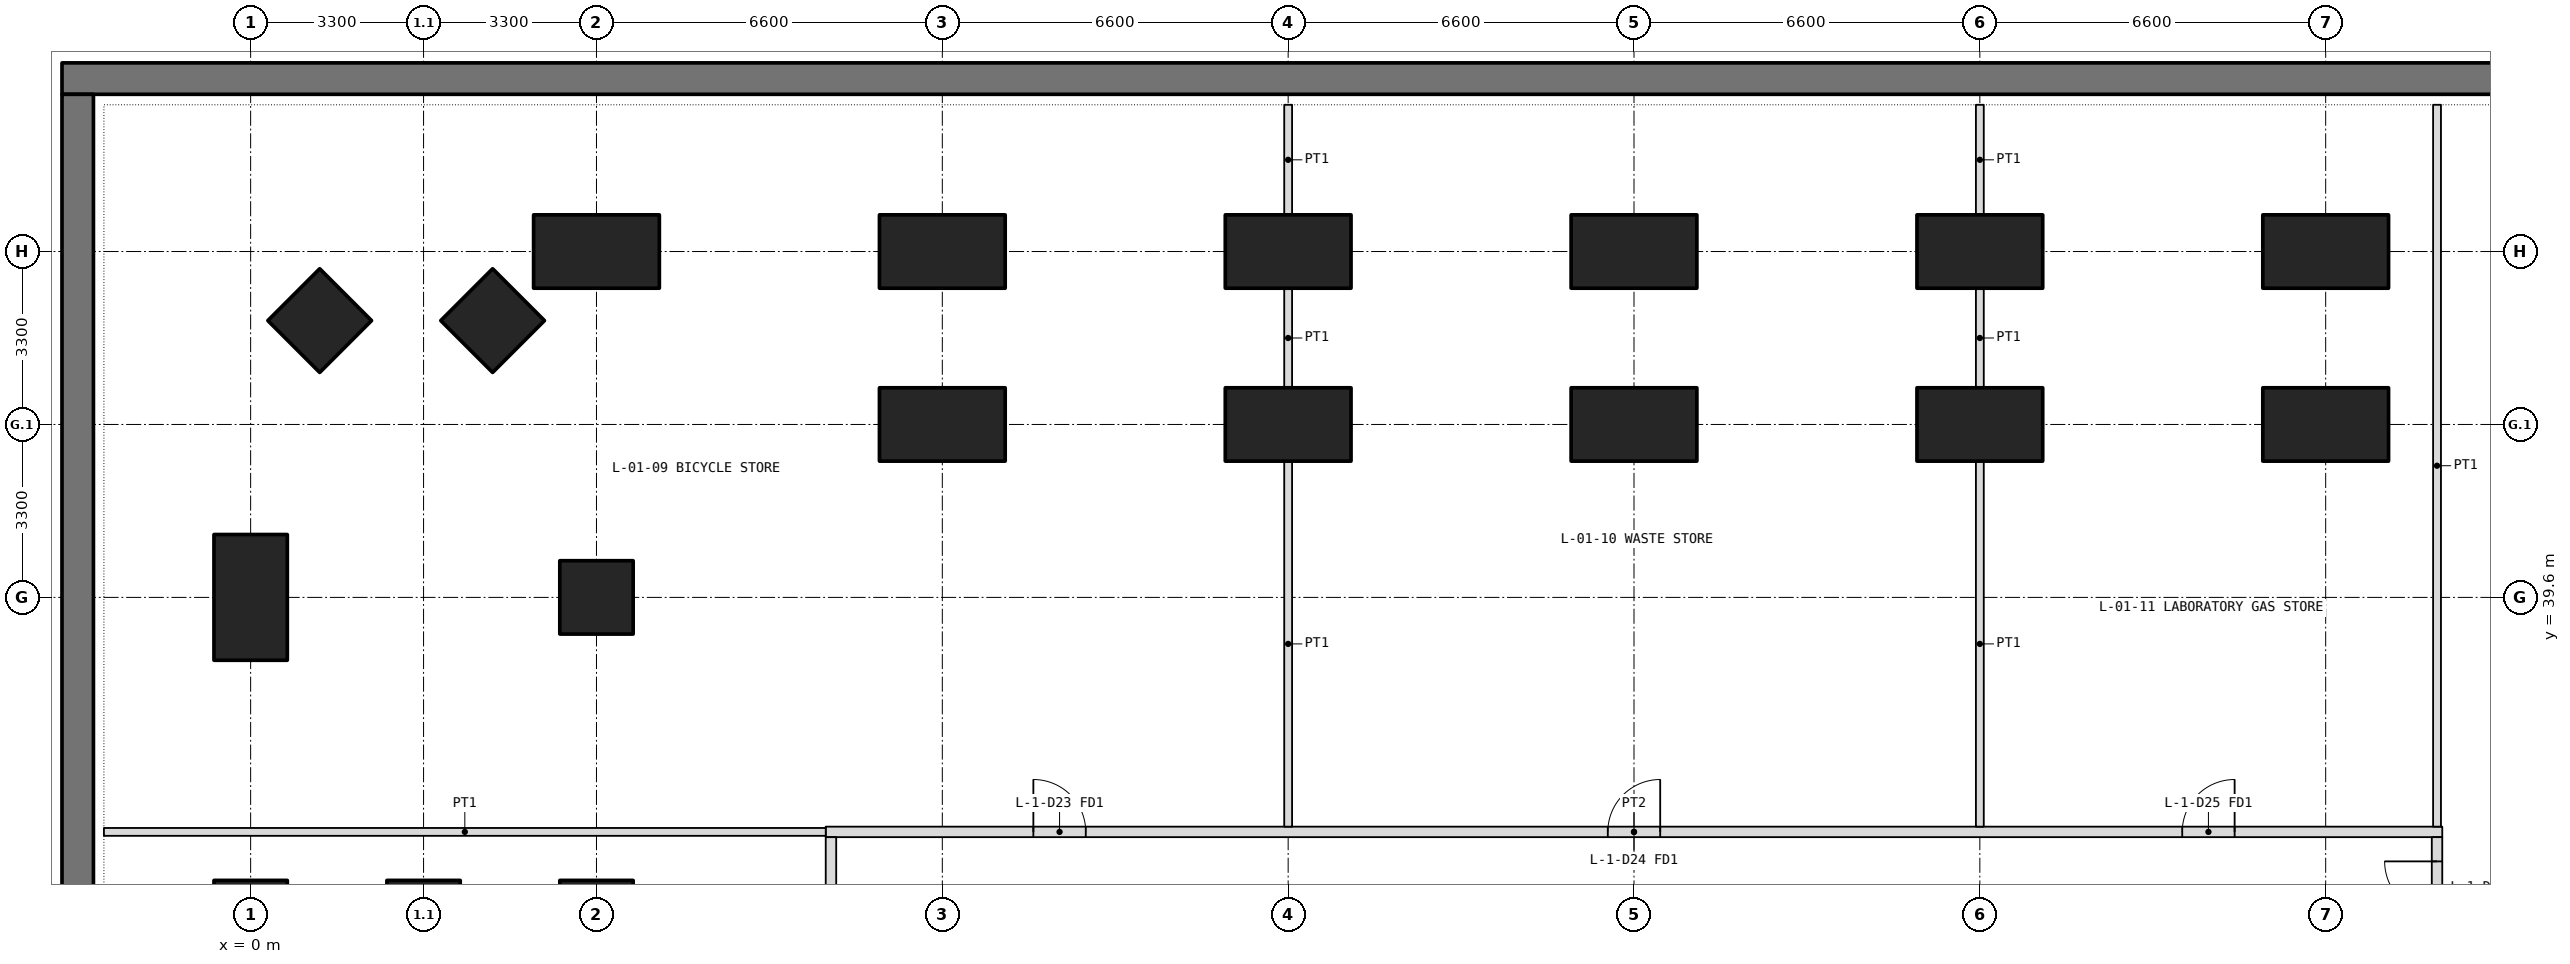
"""IFC4 building model, lengths in metres.
Left out: names, types, materials, properties, quantities, classifications, styles, units other than length and angle.
Written with IfcOpenShell. Run it as: python <this file> out.ifc"""

import sys

from ifc_helpers import new_model, si_unit, direction, frame, frame_2d, origin, origin_2d, place, context, subcontext, project, spatial, rectangle, extrude, element, fill, save


model = new_model("IFC4")
c1 = context("Model", 3, precision=1e-05, world=origin(), true_north=direction((0.0, 1.0)))
c2 = subcontext(c1, "Body", "Model", "MODEL_VIEW")
j1 = project(units=[si_unit("LENGTHUNIT", "METRE"), si_unit("PLANEANGLEUNIT", "RADIAN")], contexts=[c1])
p1 = place(None, origin())
s1 = spatial("IfcSite", under=j1, at=p1, CompositionType="ELEMENT")
p2 = place(p1, origin())
s2 = spatial("IfcBuilding", under=s1, at=p2, CompositionType="ELEMENT")
p3 = place(p2, frame((0.0, 0.0, -5.4)))
s3 = spatial("IfcBuildingStorey", under=s2, at=p3, CompositionType="ELEMENT", Elevation=-5.4)
p4 = place(p3, frame((-3.6, 49.5, -0.15), z_axis=(0.0, 0.0, 1.0), x_axis=(1.0, 0.0, 0.0)))
e1 = element("IfcWall", 1, at=p4, inside=s3, PredefinedType="SOLIDWALL", context=c2, shape_type="SweptSolid", body=[
    extrude(rectangle(XDim=60.0, YDim=0.6, at=frame_2d((30.0, 0.0))), origin(), (0.0, 0.0, 1.0), 5.2),
])
p5 = place(p3, frame((-3.3, -3.0, -0.15), z_axis=(0.0, 0.0, 1.0), x_axis=(0.0, 1.0, 0.0)))
e2 = element("IfcWall", 2, at=p5, inside=s3, PredefinedType="SOLIDWALL", context=c2, shape_type="SweptSolid", body=[
    extrude(rectangle(XDim=52.2, YDim=0.6, at=frame_2d((26.1, 0.0))), origin(), (0.0, 0.0, 1.0), 5.2),
])
p6 = place(p3, frame((1.318, 44.882, -0.15), z_axis=(0.0, 0.0, 1.0), x_axis=(0.707106781187, 0.707106781187, 0.0)))
e3 = element("IfcColumn", 3, at=p6, inside=s3, PredefinedType="COLUMN", context=c2, shape_type="SweptSolid", body=[
    extrude(rectangle(XDim=1.4, YDim=1.4, at=origin_2d()), origin(), (0.0, 0.0, 1.0), 5.55),
])
for number, where, z_axis, x_axis in (
    (4, (0.0, 33.0, -0.15), (0.0, 0.0, 1.0), (0.0, 1.0, 0.0)),
    (5, (0.0, 39.6, -0.15), (0.0, 0.0, 1.0), (0.0, 1.0, 0.0)),
    (6, (6.6, 46.2, -0.15), (0.0, 0.0, 1.0), (1.0, 0.0, 0.0)),
    (7, (13.2, 46.2, -0.15), (0.0, 0.0, 1.0), (1.0, 0.0, 0.0)),
    (8, (19.8, 46.2, -0.15), (0.0, 0.0, 1.0), (1.0, 0.0, 0.0)),
    (9, (26.4, 46.2, -0.15), (0.0, 0.0, 1.0), (1.0, 0.0, 0.0)),
    (10, (33.0, 46.2, -0.15), (0.0, 0.0, 1.0), (1.0, 0.0, 0.0)),
    (11, (39.6, 46.2, -0.15), (0.0, 0.0, 1.0), (1.0, 0.0, 0.0)),
):
    element("IfcColumn", number, at=place(p3, frame(where, z_axis=z_axis, x_axis=x_axis)), inside=s3, PredefinedType="COLUMN", context=c2, shape_type="SweptSolid", body=[
        extrude(rectangle(XDim=2.4, YDim=1.4, at=origin_2d()), origin(), (0.0, 0.0, 1.0), 5.55),
    ])
for number, where, z_axis, x_axis in (
    (12, (6.6, 39.6, -0.15), (0.0, 0.0, 1.0), (1.0, 0.0, 0.0)),
    (13, (4.618, 44.882, -0.15), (0.0, 0.0, 1.0), (0.707, 0.707, 0.0)),
):
    element("IfcColumn", number, at=place(p3, frame(where, z_axis=z_axis, x_axis=x_axis)), inside=s3, PredefinedType="COLUMN", context=c2, shape_type="SweptSolid", body=[
        extrude(rectangle(XDim=1.4, YDim=1.4, at=origin_2d()), origin(), (0.0, 0.0, 1.0), 5.55),
    ])
for number, where, z_axis, x_axis in (
    (14, (3.3, 33.0, -0.15), (0.0, 0.0, 1.0), (0.0, 1.0, 0.0)),
    (15, (13.2, 42.9, -0.15), (0.0, 0.0, 1.0), (1.0, 0.0, 0.0)),
    (16, (19.8, 42.9, -0.15), (0.0, 0.0, 1.0), (1.0, 0.0, 0.0)),
    (17, (26.4, 42.9, -0.15), (0.0, 0.0, 1.0), (1.0, 0.0, 0.0)),
    (18, (33.0, 42.9, -0.15), (0.0, 0.0, 1.0), (1.0, 0.0, 0.0)),
    (19, (39.6, 42.9, -0.15), (0.0, 0.0, 1.0), (1.0, 0.0, 0.0)),
    (20, (6.6, 33.0, -0.15), (0.0, 0.0, 1.0), (0.0, 1.0, 0.0)),
):
    element("IfcColumn", number, at=place(p3, frame(where, z_axis=z_axis, x_axis=x_axis)), inside=s3, PredefinedType="COLUMN", context=c2, shape_type="SweptSolid", body=[
        extrude(rectangle(XDim=2.4, YDim=1.4, at=origin_2d()), origin(), (0.0, 0.0, 1.0), 5.55),
    ])
p7 = place(p3, frame((10.975, 35.125, 0.0), z_axis=(0.0, 0.0, 1.0), x_axis=(1.0, 0.0, 0.0)))
e21 = element("IfcWall", 21, at=p7, inside=s3, PredefinedType="PARTITIONING", context=c2, shape_type="SweptSolid", body=[
    extrude(rectangle(XDim=30.85, YDim=0.2, at=frame_2d((15.425, 0.0))), origin(), (0.0, 0.0, 1.0), 4.05),
])
p8 = place(p7, frame((3.962, 0.0, 0.0)))
e22 = element("IfcOpeningElement", 22, at=p8, cuts=e21, PredefinedType="OPENING", context=c2, shape_type="SweptSolid", body=[
    extrude(rectangle(XDim=1.0, YDim=2.1, at=frame_2d((0.5, 1.05))), frame((0.0, 0.11, 0.0), z_axis=(0.0, -1.0, 0.0), x_axis=(1.0, 0.0, 0.0)), (0.0, 0.0, 1.0), 0.22),
])
p9 = place(p7, frame((14.925, 0.0, 0.0)))
e23 = element("IfcOpeningElement", 23, at=p9, cuts=e21, PredefinedType="OPENING", context=c2, shape_type="SweptSolid", body=[
    extrude(rectangle(XDim=1.0, YDim=2.1, at=frame_2d((0.5, 1.05))), frame((0.0, 0.11, 0.0), z_axis=(0.0, -1.0, 0.0), x_axis=(1.0, 0.0, 0.0)), (0.0, 0.0, 1.0), 0.22),
])
p10 = place(p7, frame((25.887, 0.0, 0.0)))
e24 = element("IfcOpeningElement", 24, at=p10, cuts=e21, PredefinedType="OPENING", context=c2, shape_type="SweptSolid", body=[
    extrude(rectangle(XDim=1.0, YDim=2.1, at=frame_2d((0.5, 1.05))), frame((0.0, 0.11, 0.0), z_axis=(0.0, -1.0, 0.0), x_axis=(1.0, 0.0, 0.0)), (0.0, 0.0, 1.0), 0.22),
])
p11 = place(p3, frame((11.075, 11.175, 0.0), z_axis=(0.0, 0.0, 1.0), x_axis=(0.0, 1.0, 0.0)))
e25 = element("IfcWall", 25, at=p11, inside=s3, PredefinedType="PARTITIONING", context=c2, shape_type="SweptSolid", body=[
    extrude(rectangle(XDim=23.85, YDim=0.2, at=frame_2d((11.925, 0.0))), origin(), (0.0, 0.0, 1.0), 4.05),
])
p12 = place(p11, frame((0.212, 0.0, 0.0)))
e26 = element("IfcOpeningElement", 26, at=p12, cuts=e25, PredefinedType="OPENING", context=c2, shape_type="SweptSolid", body=[
    extrude(rectangle(XDim=1.8, YDim=2.4, at=frame_2d((0.9, 1.2))), frame((0.0, 0.11, 0.0), z_axis=(0.0, -1.0, 0.0), x_axis=(1.0, 0.0, 0.0)), (0.0, 0.0, 1.0), 0.22),
])
p13 = place(p11, frame((2.575, 0.0, 0.0)))
e27 = element("IfcOpeningElement", 27, at=p13, cuts=e25, PredefinedType="OPENING", context=c2, shape_type="SweptSolid", body=[
    extrude(rectangle(XDim=1.0, YDim=2.1, at=frame_2d((0.5, 1.05))), frame((0.0, 0.11, 0.0), z_axis=(0.0, -1.0, 0.0), x_axis=(1.0, 0.0, 0.0)), (0.0, 0.0, 1.0), 0.22),
])
p14 = place(p11, frame((5.675, 0.0, 0.0)))
e28 = element("IfcOpeningElement", 28, at=p14, cuts=e25, PredefinedType="OPENING", context=c2, shape_type="SweptSolid", body=[
    extrude(rectangle(XDim=0.9, YDim=2.1, at=frame_2d((0.45, 1.05))), frame((0.0, 0.11, 0.0), z_axis=(0.0, -1.0, 0.0), x_axis=(1.0, 0.0, 0.0)), (0.0, 0.0, 1.0), 0.22),
])
p15 = place(p11, frame((9.575, 0.0, 0.0)))
e29 = element("IfcOpeningElement", 29, at=p15, cuts=e25, PredefinedType="OPENING", context=c2, shape_type="SweptSolid", body=[
    extrude(rectangle(XDim=0.9, YDim=2.1, at=frame_2d((0.45, 1.05))), frame((0.0, 0.11, 0.0), z_axis=(0.0, -1.0, 0.0), x_axis=(1.0, 0.0, 0.0)), (0.0, 0.0, 1.0), 0.22),
])
p16 = place(p11, frame((12.675, 0.0, 0.0)))
e30 = element("IfcOpeningElement", 30, at=p16, cuts=e25, PredefinedType="OPENING", context=c2, shape_type="SweptSolid", body=[
    extrude(rectangle(XDim=1.8, YDim=2.4, at=frame_2d((0.9, 1.2))), frame((0.0, 0.11, 0.0), z_axis=(0.0, -1.0, 0.0), x_axis=(1.0, 0.0, 0.0)), (0.0, 0.0, 1.0), 0.22),
])
p17 = place(p11, frame((19.087, 0.0, 0.0)))
e31 = element("IfcOpeningElement", 31, at=p17, cuts=e25, PredefinedType="OPENING", context=c2, shape_type="SweptSolid", body=[
    extrude(rectangle(XDim=1.0, YDim=2.1, at=frame_2d((0.5, 1.05))), frame((0.0, 0.11, 0.0), z_axis=(0.0, -1.0, 0.0), x_axis=(1.0, 0.0, 0.0)), (0.0, 0.0, 1.0), 0.22),
])
p18 = place(p3, frame((41.725, 11.175, 0.0), z_axis=(0.0, 0.0, 1.0), x_axis=(0.0, 1.0, 0.0)))
e32 = element("IfcWall", 32, at=p18, inside=s3, PredefinedType="PARTITIONING", context=c2, shape_type="SweptSolid", body=[
    extrude(rectangle(XDim=23.85, YDim=0.2, at=frame_2d((11.925, 0.0))), origin(), (0.0, 0.0, 1.0), 4.05),
])
p19 = place(p18, frame((3.363, 0.0, 0.0)))
e33 = element("IfcOpeningElement", 33, at=p19, cuts=e32, PredefinedType="OPENING", context=c2, shape_type="SweptSolid", body=[
    extrude(rectangle(XDim=1.8, YDim=2.4, at=frame_2d((0.9, 1.2))), frame((0.0, 0.11, 0.0), z_axis=(0.0, -1.0, 0.0), x_axis=(1.0, 0.0, 0.0)), (0.0, 0.0, 1.0), 0.22),
])
p20 = place(p18, frame((9.625, 0.0, 0.0)))
e34 = element("IfcOpeningElement", 34, at=p20, cuts=e32, PredefinedType="OPENING", context=c2, shape_type="SweptSolid", body=[
    extrude(rectangle(XDim=1.0, YDim=2.1, at=frame_2d((0.5, 1.05))), frame((0.0, 0.11, 0.0), z_axis=(0.0, -1.0, 0.0), x_axis=(1.0, 0.0, 0.0)), (0.0, 0.0, 1.0), 0.22),
])
p21 = place(p18, frame((12.975, 0.0, 0.0)))
e35 = element("IfcOpeningElement", 35, at=p21, cuts=e32, PredefinedType="OPENING", context=c2, shape_type="SweptSolid", body=[
    extrude(rectangle(XDim=0.9, YDim=2.1, at=frame_2d((0.45, 1.05))), frame((0.0, 0.11, 0.0), z_axis=(0.0, -1.0, 0.0), x_axis=(1.0, 0.0, 0.0)), (0.0, 0.0, 1.0), 0.22),
])
p22 = place(p18, frame((18.025, 0.0, 0.0)))
e36 = element("IfcOpeningElement", 36, at=p22, cuts=e32, PredefinedType="OPENING", context=c2, shape_type="SweptSolid", body=[
    extrude(rectangle(XDim=1.0, YDim=2.1, at=frame_2d((0.5, 1.05))), frame((0.0, 0.11, 0.0), z_axis=(0.0, -1.0, 0.0), x_axis=(1.0, 0.0, 0.0)), (0.0, 0.0, 1.0), 0.22),
])
p23 = place(p18, frame((22.387, 0.0, 0.0)))
e37 = element("IfcOpeningElement", 37, at=p23, cuts=e32, PredefinedType="OPENING", context=c2, shape_type="SweptSolid", body=[
    extrude(rectangle(XDim=1.0, YDim=2.1, at=frame_2d((0.5, 1.05))), frame((0.0, 0.11, 0.0), z_axis=(0.0, -1.0, 0.0), x_axis=(1.0, 0.0, 0.0)), (0.0, 0.0, 1.0), 0.22),
])
p24 = place(p3, frame((41.725, 49.0, 0.0), z_axis=(0.0, 0.0, 1.0), x_axis=(0.0, -1.0, 0.0)))
e38 = element("IfcWall", 38, at=p24, inside=s3, PredefinedType="PARTITIONING", context=c2, shape_type="SweptSolid", body=[
    extrude(rectangle(XDim=13.775, YDim=0.15, at=frame_2d((6.887, 0.0))), origin(), (0.0, 0.0, 1.0), 3.85),
])
p25 = place(p3, frame((-2.8, 35.125, 0.0), z_axis=(0.0, 0.0, 1.0), x_axis=(1.0, 0.0, 0.0)))
e39 = element("IfcWall", 39, at=p25, inside=s3, PredefinedType="PARTITIONING", context=c2, shape_type="SweptSolid", body=[
    extrude(rectangle(XDim=13.775, YDim=0.15, at=frame_2d((6.888, 0.0))), origin(), (0.0, 0.0, 1.0), 3.85),
])
p26 = place(p3, frame((19.8, 49.0, 0.0), z_axis=(0.0, 0.0, 1.0), x_axis=(0.0, -1.0, 0.0)))
e40 = element("IfcWall", 40, at=p26, inside=s3, PredefinedType="PARTITIONING", context=c2, shape_type="SweptSolid", body=[
    extrude(rectangle(XDim=2.1, YDim=0.15, at=frame_2d((1.05, 0.0))), origin(), (0.0, 0.0, 1.0), 4.05),
])
p27 = place(p3, frame((19.8, 45.5, 0.0), z_axis=(0.0, 0.0, 1.0), x_axis=(0.0, -1.0, 0.0)))
e41 = element("IfcWall", 41, at=p27, inside=s3, PredefinedType="PARTITIONING", context=c2, shape_type="SweptSolid", body=[
    extrude(rectangle(XDim=1.9, YDim=0.15, at=frame_2d((0.95, 0.0))), origin(), (0.0, 0.0, 1.0), 4.05),
])
p28 = place(p3, frame((19.8, 42.2, 0.0), z_axis=(0.0, 0.0, 1.0), x_axis=(0.0, -1.0, 0.0)))
e42 = element("IfcWall", 42, at=p28, inside=s3, PredefinedType="PARTITIONING", context=c2, shape_type="SweptSolid", body=[
    extrude(rectangle(XDim=6.975, YDim=0.15, at=frame_2d((3.487, 0.0))), origin(), (0.0, 0.0, 1.0), 4.05),
])
p29 = place(p3, frame((33.0, 49.0, 0.0), z_axis=(0.0, 0.0, 1.0), x_axis=(0.0, -1.0, 0.0)))
e43 = element("IfcWall", 43, at=p29, inside=s3, PredefinedType="PARTITIONING", context=c2, shape_type="SweptSolid", body=[
    extrude(rectangle(XDim=2.1, YDim=0.15, at=frame_2d((1.05, 0.0))), origin(), (0.0, 0.0, 1.0), 4.05),
])
p30 = place(p3, frame((33.0, 45.5, 0.0), z_axis=(0.0, 0.0, 1.0), x_axis=(0.0, -1.0, 0.0)))
e44 = element("IfcWall", 44, at=p30, inside=s3, PredefinedType="PARTITIONING", context=c2, shape_type="SweptSolid", body=[
    extrude(rectangle(XDim=1.9, YDim=0.15, at=frame_2d((0.95, 0.0))), origin(), (0.0, 0.0, 1.0), 4.05),
])
p31 = place(p3, frame((33.0, 42.2, 0.0), z_axis=(0.0, 0.0, 1.0), x_axis=(0.0, -1.0, 0.0)))
e45 = element("IfcWall", 45, at=p31, inside=s3, PredefinedType="PARTITIONING", context=c2, shape_type="SweptSolid", body=[
    extrude(rectangle(XDim=6.975, YDim=0.15, at=frame_2d((3.487, 0.0))), origin(), (0.0, 0.0, 1.0), 4.05),
])
p32 = place(p23, origin())
e46 = element("IfcDoor", 46, at=p32, inside=s3, OperationType="SINGLE_SWING_RIGHT", PredefinedType="DOOR", context=c2, shape_type="SweptSolid", body=[
    extrude(rectangle(XDim=1.0, YDim=2.1, at=frame_2d((0.5, 1.05))), frame((0.0, 0.025, 0.0), z_axis=(0.0, -1.0, 0.0), x_axis=(1.0, 0.0, 0.0)), (0.0, 0.0, 1.0), 0.05),
])
fill(e37, e46)
p33 = place(p8, origin())
e47 = element("IfcDoor", 47, at=p33, inside=s3, OperationType="SINGLE_SWING_LEFT", PredefinedType="DOOR", context=c2, shape_type="SweptSolid", body=[
    extrude(rectangle(XDim=1.0, YDim=2.1, at=frame_2d((0.5, 1.05))), frame((0.0, 0.025, 0.0), z_axis=(0.0, -1.0, 0.0), x_axis=(1.0, 0.0, 0.0)), (0.0, 0.0, 1.0), 0.05),
])
fill(e22, e47)
p34 = place(p9, origin())
e48 = element("IfcDoor", 48, at=p34, inside=s3, OperationType="SINGLE_SWING_RIGHT", PredefinedType="DOOR", context=c2, shape_type="SweptSolid", body=[
    extrude(rectangle(XDim=1.0, YDim=2.1, at=frame_2d((0.5, 1.05))), frame((0.0, 0.025, 0.0), z_axis=(0.0, -1.0, 0.0), x_axis=(1.0, 0.0, 0.0)), (0.0, 0.0, 1.0), 0.05),
])
fill(e23, e48)
p35 = place(p10, origin())
e49 = element("IfcDoor", 49, at=p35, inside=s3, OperationType="SINGLE_SWING_RIGHT", PredefinedType="DOOR", context=c2, shape_type="SweptSolid", body=[
    extrude(rectangle(XDim=1.0, YDim=2.1, at=frame_2d((0.5, 1.05))), frame((0.0, 0.025, 0.0), z_axis=(0.0, -1.0, 0.0), x_axis=(1.0, 0.0, 0.0)), (0.0, 0.0, 1.0), 0.05),
])
fill(e24, e49)
save(model, sys.argv[1])
